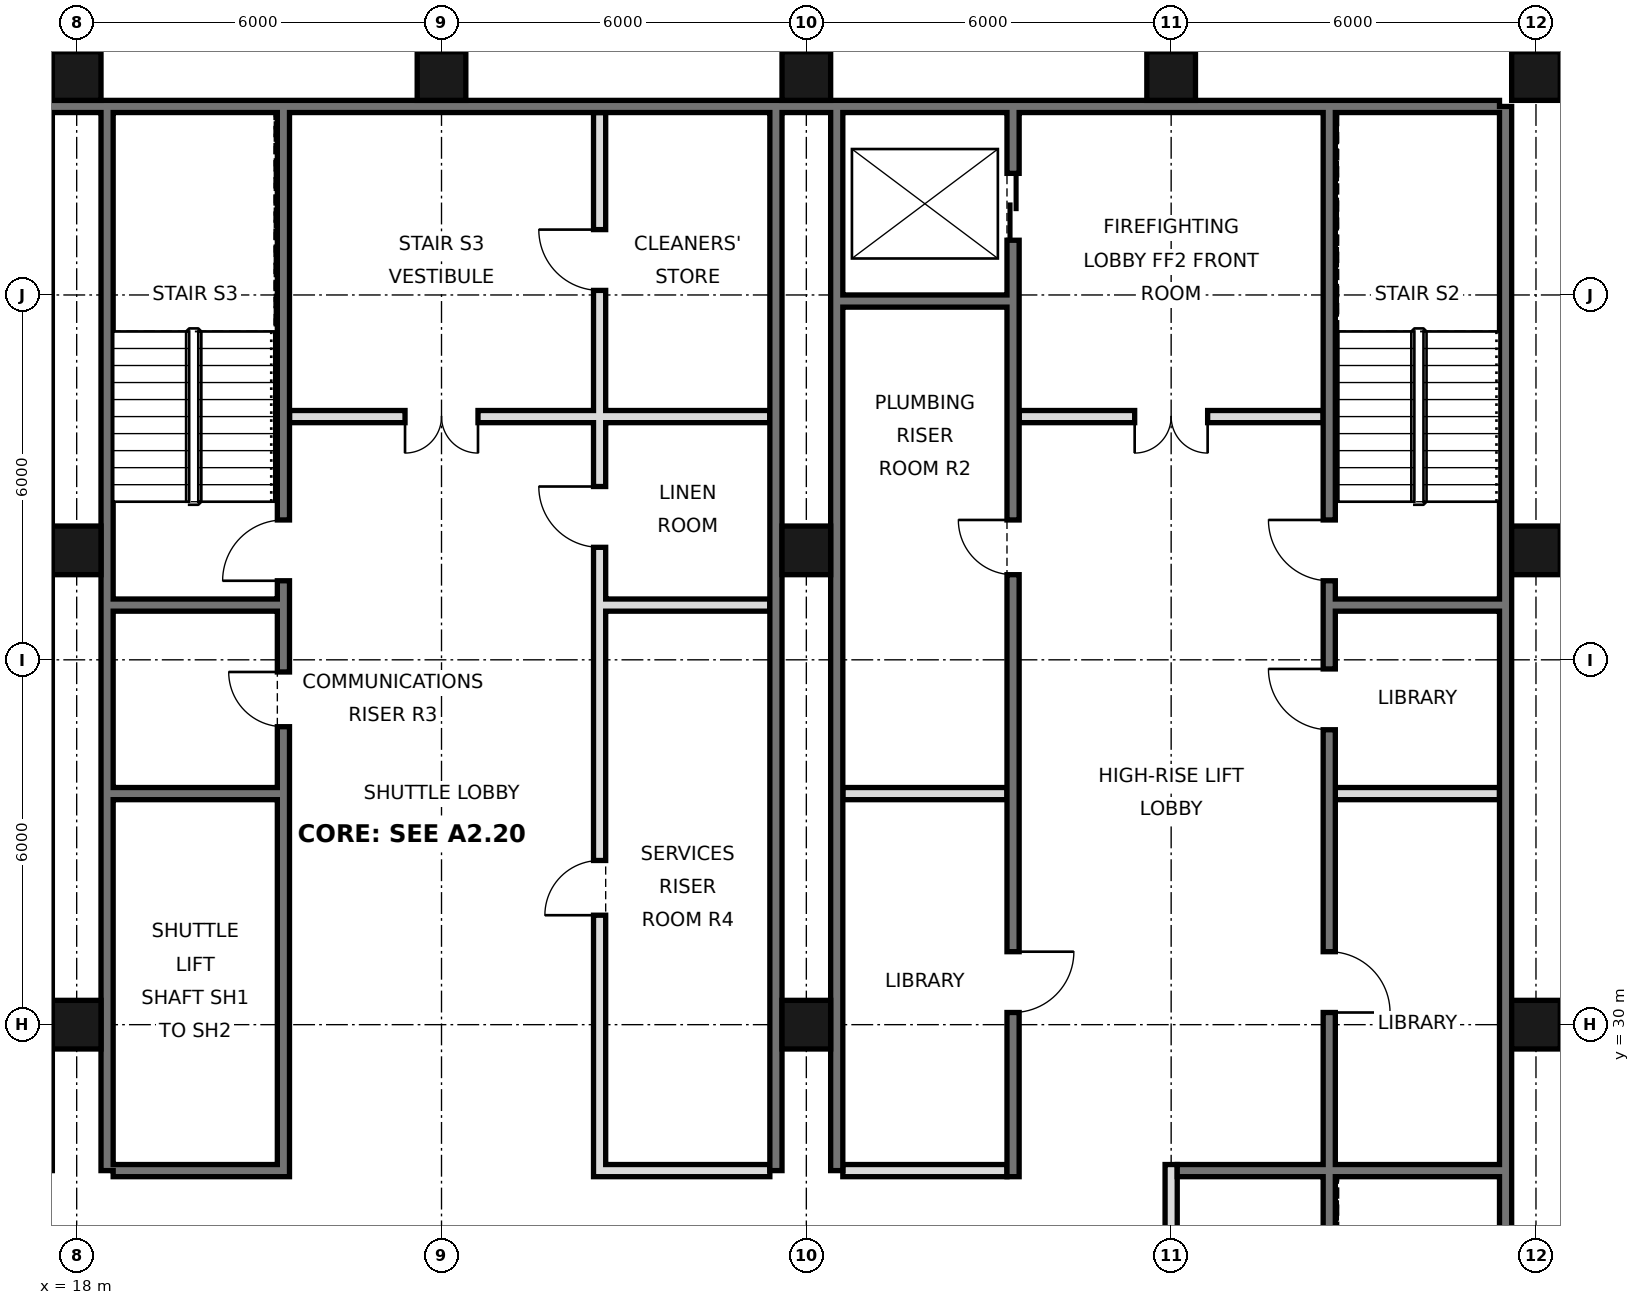
"""IFC4 building model, lengths in metres.
Left out: names, types, materials, properties, quantities, classifications, styles, units other than length and angle.
Written with IfcOpenShell. Run it as: python <this file> out.ifc"""

import sys

from ifc_helpers import new_model, si_unit, direction, frame, frame_2d, origin, origin_2d, place, context, subcontext, project, spatial, rectangle, hollow_rectangle, extrude, element, fill, save


model = new_model("IFC4")
c1 = context("Model", 3, precision=1e-05, world=origin(), true_north=direction((0.0, 1.0)))
c2 = subcontext(c1, "Body", "Model", "MODEL_VIEW")
j1 = project(units=[si_unit("LENGTHUNIT", "METRE"), si_unit("PLANEANGLEUNIT", "RADIAN")], contexts=[c1])
p1 = place(None, origin())
s1 = spatial("IfcSite", under=j1, at=p1, CompositionType="ELEMENT")
p2 = place(p1, origin())
s2 = spatial("IfcBuilding", under=s1, at=p2, CompositionType="ELEMENT")
p3 = place(p2, frame((0.0, 0.0, 78.6)))
s3 = spatial("IfcBuildingStorey", under=s2, at=p3, CompositionType="ELEMENT", Elevation=78.6)
for number, where, z_axis, x_axis in (
    (1, (18.0, 30.0, 0.0), (0.0, 0.0, 1.0), (1.0, 0.0, 0.0)),
    (2, (18.0, 37.8, 0.0), (0.0, 0.0, 1.0), (1.0, 0.0, 0.0)),
    (3, (18.0, 45.6, 0.0), (0.0, 0.0, 1.0), (1.0, 0.0, 0.0)),
    (4, (24.0, 45.6, 0.0), (0.0, 0.0, 1.0), (1.0, 0.0, 0.0)),
    (5, (30.0, 30.0, 0.0), (0.0, 0.0, 1.0), (1.0, 0.0, 0.0)),
    (6, (30.0, 37.8, 0.0), (0.0, 0.0, 1.0), (1.0, 0.0, 0.0)),
    (7, (30.0, 45.6, 0.0), (0.0, 0.0, 1.0), (1.0, 0.0, 0.0)),
    (8, (36.0, 45.6, 0.0), (0.0, 0.0, 1.0), (1.0, 0.0, 0.0)),
    (9, (42.0, 30.0, 0.0), (0.0, 0.0, 1.0), (1.0, 0.0, 0.0)),
    (10, (42.0, 37.8, 0.0), (0.0, 0.0, 1.0), (1.0, 0.0, 0.0)),
    (11, (42.0, 45.6, 0.0), (0.0, 0.0, 1.0), (1.0, 0.0, 0.0)),
):
    element("IfcColumn", number, at=place(p3, frame(where, z_axis=z_axis, x_axis=x_axis)), inside=s3, PredefinedType="COLUMN", context=c2, shape_type="SweptSolid", body=[
        extrude(hollow_rectangle(XDim=0.8, YDim=0.8, WallThickness=0.06, at=origin_2d()), origin(), (0.0, 0.0, 1.0), 3.6),
    ])
p4 = place(p3, frame((41.5, 21.6, 0.0), z_axis=(0.0, 0.0, 1.0), x_axis=(0.0, 1.0, 0.0)))
e12 = element("IfcWall", 12, at=p4, inside=s3, PredefinedType="SOLIDWALL", context=c2, shape_type="SweptSolid", body=[
    extrude(rectangle(XDim=23.5, YDim=0.2, at=frame_2d((11.75, 0.0))), origin(), (0.0, 0.0, 1.0), 3.42),
])
p5 = place(p3, frame((6.6, 45.1, 0.0), z_axis=(0.0, 0.0, 1.0), x_axis=(1.0, 0.0, 0.0)))
e13 = element("IfcWall", 13, at=p5, inside=s3, PredefinedType="SOLIDWALL", context=c2, shape_type="SweptSolid", body=[
    extrude(rectangle(XDim=34.8, YDim=0.2, at=frame_2d((17.4, 0.0))), origin(), (0.0, 0.0, 1.0), 3.42),
])
for number, where, z_axis, x_axis in (
    (14, (18.5, 27.6, 0.0), (0.0, 0.0, 1.0), (0.0, 1.0, 0.0)),
    (15, (29.5, 27.6, 0.0), (0.0, 0.0, 1.0), (0.0, 1.0, 0.0)),
    (16, (30.5, 27.6, 0.0), (0.0, 0.0, 1.0), (0.0, 1.0, 0.0)),
):
    element("IfcWall", number, at=place(p3, frame(where, z_axis=z_axis, x_axis=x_axis)), inside=s3, PredefinedType="SOLIDWALL", context=c2, shape_type="SweptSolid", body=[
        extrude(rectangle(XDim=17.5, YDim=0.2, at=frame_2d((8.75, 0.0))), origin(), (0.0, 0.0, 1.0), 3.42),
    ])
p6 = place(p3, frame((21.4, 27.5, 0.0), z_axis=(0.0, 0.0, 1.0), x_axis=(0.0, 1.0, 0.0)))
e17 = element("IfcWall", 17, at=p6, inside=s3, PredefinedType="SOLIDWALL", context=c2, shape_type="SweptSolid", body=[
    extrude(rectangle(XDim=17.5, YDim=0.2, at=frame_2d((8.75, 0.0))), origin(), (0.0, 0.0, 1.0), 3.42),
])
p7 = place(p6, frame((9.8, 0.0, 0.0)))
e18 = element("IfcOpeningElement", 18, at=p7, cuts=e17, PredefinedType="OPENING", context=c2, shape_type="SweptSolid", body=[
    extrude(rectangle(XDim=1.0, YDim=2.1, at=frame_2d((0.5, 1.05))), frame((0.0, 0.11, 0.0), z_axis=(0.0, -1.0, 0.0), x_axis=(1.0, 0.0, 0.0)), (0.0, 0.0, 1.0), 0.22),
])
p8 = place(p6, frame((7.4, 0.0, 0.0)))
e19 = element("IfcOpeningElement", 19, at=p8, cuts=e17, PredefinedType="OPENING", context=c2, shape_type="SweptSolid", body=[
    extrude(rectangle(XDim=0.9, YDim=2.1, at=frame_2d((0.45, 1.05))), frame((0.0, 0.11, 0.0), z_axis=(0.0, -1.0, 0.0), x_axis=(1.0, 0.0, 0.0)), (0.0, 0.0, 1.0), 0.22),
])
p9 = place(p3, frame((26.6, 27.5, 0.0), z_axis=(0.0, 0.0, 1.0), x_axis=(0.0, 1.0, 0.0)))
e20 = element("IfcWall", 20, at=p9, inside=s3, PredefinedType="SOLIDWALL", context=c2, shape_type="SweptSolid", body=[
    extrude(rectangle(XDim=17.5, YDim=0.2, at=frame_2d((8.75, 0.0))), origin(), (0.0, 0.0, 1.0), 3.42),
])
p10 = place(p9, frame((4.3, 0.0, 0.0)))
e21 = element("IfcOpeningElement", 21, at=p10, cuts=e20, PredefinedType="OPENING", context=c2, shape_type="SweptSolid", body=[
    extrude(rectangle(XDim=0.9, YDim=2.1, at=frame_2d((0.45, 1.05))), frame((0.0, 0.11, 0.0), z_axis=(0.0, -1.0, 0.0), x_axis=(1.0, 0.0, 0.0)), (0.0, 0.0, 1.0), 0.22),
])
p11 = place(p9, frame((10.35, 0.0, 0.0)))
e22 = element("IfcOpeningElement", 22, at=p11, cuts=e20, PredefinedType="OPENING", context=c2, shape_type="SweptSolid", body=[
    extrude(rectangle(XDim=1.0, YDim=2.1, at=frame_2d((0.5, 1.05))), frame((0.0, 0.11, 0.0), z_axis=(0.0, -1.0, 0.0), x_axis=(1.0, 0.0, 0.0)), (0.0, 0.0, 1.0), 0.22),
])
p12 = place(p9, frame((14.575, 0.0, 0.0)))
e23 = element("IfcOpeningElement", 23, at=p12, cuts=e20, PredefinedType="OPENING", context=c2, shape_type="SweptSolid", body=[
    extrude(rectangle(XDim=1.0, YDim=2.1, at=frame_2d((0.5, 1.05))), frame((0.0, 0.11, 0.0), z_axis=(0.0, -1.0, 0.0), x_axis=(1.0, 0.0, 0.0)), (0.0, 0.0, 1.0), 0.22),
])
p13 = place(p3, frame((33.4, 27.5, 0.0), z_axis=(0.0, 0.0, 1.0), x_axis=(0.0, 1.0, 0.0)))
e24 = element("IfcWall", 24, at=p13, inside=s3, PredefinedType="SOLIDWALL", context=c2, shape_type="SweptSolid", body=[
    extrude(rectangle(XDim=17.5, YDim=0.2, at=frame_2d((8.75, 0.0))), origin(), (0.0, 0.0, 1.0), 3.42),
])
p14 = place(p13, frame((15.4, 0.0, 0.0)))
e25 = element("IfcOpeningElement", 25, at=p14, cuts=e24, PredefinedType="OPENING", context=c2, shape_type="SweptSolid", body=[
    extrude(rectangle(XDim=1.1, YDim=2.1, at=frame_2d((0.55, 1.05))), frame((0.0, 0.11, 0.0), z_axis=(0.0, -1.0, 0.0), x_axis=(1.0, 0.0, 0.0)), (0.0, 0.0, 1.0), 0.22),
])
p15 = place(p13, frame((2.7, 0.0, 0.0)))
e26 = element("IfcOpeningElement", 26, at=p15, cuts=e24, PredefinedType="OPENING", context=c2, shape_type="SweptSolid", body=[
    extrude(rectangle(XDim=1.0, YDim=2.1, at=frame_2d((0.5, 1.05))), frame((0.0, 0.11, 0.0), z_axis=(0.0, -1.0, 0.0), x_axis=(1.0, 0.0, 0.0)), (0.0, 0.0, 1.0), 0.22),
])
p16 = place(p13, frame((9.9, 0.0, 0.0)))
e27 = element("IfcOpeningElement", 27, at=p16, cuts=e24, PredefinedType="OPENING", context=c2, shape_type="SweptSolid", body=[
    extrude(rectangle(XDim=0.9, YDim=2.1, at=frame_2d((0.45, 1.05))), frame((0.0, 0.11, 0.0), z_axis=(0.0, -1.0, 0.0), x_axis=(1.0, 0.0, 0.0)), (0.0, 0.0, 1.0), 0.22),
])
p17 = place(p3, frame((36.0, 21.6, 0.0), z_axis=(0.0, 0.0, 1.0), x_axis=(0.0, 1.0, 0.0)))
e28 = element("IfcWall", 28, at=p17, inside=s3, PredefinedType="PARTITIONING", context=c2, shape_type="SweptSolid", body=[
    extrude(rectangle(XDim=6.1, YDim=0.2, at=frame_2d((3.05, 0.0))), origin(), (0.0, 0.0, 1.0), 3.42),
])
p18 = place(p3, frame((38.6, 21.6, 0.0), z_axis=(0.0, 0.0, 1.0), x_axis=(0.0, 1.0, 0.0)))
e29 = element("IfcWall", 29, at=p18, inside=s3, PredefinedType="SOLIDWALL", context=c2, shape_type="SweptSolid", body=[
    extrude(rectangle(XDim=23.4, YDim=0.2, at=frame_2d((11.7, 0.0))), origin(), (0.0, 0.0, 1.0), 3.42),
])
p19 = place(p18, frame((8.6, 0.0, 0.0)))
e30 = element("IfcOpeningElement", 30, at=p19, cuts=e29, PredefinedType="OPENING", context=c2, shape_type="SweptSolid", body=[
    extrude(rectangle(XDim=1.0, YDim=2.1, at=frame_2d((0.5, 1.05))), frame((0.0, 0.11, 0.0), z_axis=(0.0, -1.0, 0.0), x_axis=(1.0, 0.0, 0.0)), (0.0, 0.0, 1.0), 0.22),
])
p20 = place(p18, frame((13.25, 0.0, 0.0)))
e31 = element("IfcOpeningElement", 31, at=p20, cuts=e29, PredefinedType="OPENING", context=c2, shape_type="SweptSolid", body=[
    extrude(rectangle(XDim=1.0, YDim=2.1, at=frame_2d((0.5, 1.05))), frame((0.0, 0.11, 0.0), z_axis=(0.0, -1.0, 0.0), x_axis=(1.0, 0.0, 0.0)), (0.0, 0.0, 1.0), 0.22),
])
p21 = place(p18, frame((15.7, 0.0, 0.0)))
e32 = element("IfcOpeningElement", 32, at=p21, cuts=e29, PredefinedType="OPENING", context=c2, shape_type="SweptSolid", body=[
    extrude(rectangle(XDim=1.0, YDim=2.1, at=frame_2d((0.5, 1.05))), frame((0.0, 0.11, 0.0), z_axis=(0.0, -1.0, 0.0), x_axis=(1.0, 0.0, 0.0)), (0.0, 0.0, 1.0), 0.22),
])
p22 = place(p18, frame((0.175, 0.0, 0.0)))
e33 = element("IfcOpeningElement", 33, at=p22, cuts=e29, PredefinedType="OPENING", context=c2, shape_type="SweptSolid", body=[
    extrude(rectangle(XDim=0.9, YDim=2.1, at=frame_2d((0.45, 1.05))), frame((0.0, 0.11, 0.0), z_axis=(0.0, -1.0, 0.0), x_axis=(1.0, 0.0, 0.0)), (0.0, 0.0, 1.0), 0.22),
])
for number, where, z_axis, x_axis in (
    (34, (18.6, 27.6, 0.0), (0.0, 0.0, 1.0), (1.0, 0.0, 0.0)),
    (35, (26.7, 27.6, 0.0), (0.0, 0.0, 1.0), (1.0, 0.0, 0.0)),
):
    element("IfcWall", number, at=place(p3, frame(where, z_axis=z_axis, x_axis=x_axis)), inside=s3, PredefinedType="SOLIDWALL", context=c2, shape_type="SweptSolid", body=[
        extrude(rectangle(XDim=2.7, YDim=0.2, at=frame_2d((1.35, 0.0))), origin(), (0.0, 0.0, 1.0), 3.42),
    ])
p23 = place(p3, frame((30.6, 27.6, 0.0), z_axis=(0.0, 0.0, 1.0), x_axis=(1.0, 0.0, 0.0)))
e36 = element("IfcWall", 36, at=p23, inside=s3, PredefinedType="PARTITIONING", context=c2, shape_type="SweptSolid", body=[
    extrude(rectangle(XDim=2.7, YDim=0.2, at=frame_2d((1.35, 0.0))), origin(), (0.0, 0.0, 1.0), 3.42),
])
p24 = place(p3, frame((36.1, 27.6, 0.0), z_axis=(0.0, 0.0, 1.0), x_axis=(1.0, 0.0, 0.0)))
e37 = element("IfcWall", 37, at=p24, inside=s3, PredefinedType="SOLIDWALL", context=c2, shape_type="SweptSolid", body=[
    extrude(rectangle(XDim=5.3, YDim=0.2, at=frame_2d((2.65, 0.0))), origin(), (0.0, 0.0, 1.0), 3.42),
])
for number, where, z_axis, x_axis in (
    (38, (18.6, 33.8, 0.0), (0.0, 0.0, 1.0), (1.0, 0.0, 0.0)),
    (39, (30.6, 33.8, 0.0), (0.0, 0.0, 1.0), (1.0, 0.0, 0.0)),
):
    element("IfcWall", number, at=place(p3, frame(where, z_axis=z_axis, x_axis=x_axis)), inside=s3, PredefinedType="SOLIDWALL", context=c2, shape_type="SweptSolid", body=[
        extrude(rectangle(XDim=2.7, YDim=0.2, at=frame_2d((1.35, 0.0))), origin(), (0.0, 0.0, 1.0), 3.42),
    ])
p25 = place(p3, frame((38.7, 33.8, 0.0), z_axis=(0.0, 0.0, 1.0), x_axis=(1.0, 0.0, 0.0)))
e40 = element("IfcWall", 40, at=p25, inside=s3, PredefinedType="PARTITIONING", context=c2, shape_type="SweptSolid", body=[
    extrude(rectangle(XDim=2.7, YDim=0.2, at=frame_2d((1.35, 0.0))), origin(), (0.0, 0.0, 1.0), 3.42),
])
for number, where, z_axis, x_axis in (
    (41, (18.6, 36.9, 0.0), (0.0, 0.0, 1.0), (1.0, 0.0, 0.0)),
    (42, (26.7, 36.9, 0.0), (0.0, 0.0, 1.0), (1.0, 0.0, 0.0)),
    (43, (38.7, 36.9, 0.0), (0.0, 0.0, 1.0), (1.0, 0.0, 0.0)),
):
    element("IfcWall", number, at=place(p3, frame(where, z_axis=z_axis, x_axis=x_axis)), inside=s3, PredefinedType="SOLIDWALL", context=c2, shape_type="SweptSolid", body=[
        extrude(rectangle(XDim=2.7, YDim=0.2, at=frame_2d((1.35, 0.0))), origin(), (0.0, 0.0, 1.0), 3.42),
    ])
p26 = place(p3, frame((21.5, 40.0, 0.0), z_axis=(0.0, 0.0, 1.0), x_axis=(1.0, 0.0, 0.0)))
e44 = element("IfcWall", 44, at=p26, inside=s3, PredefinedType="PARTITIONING", context=c2, shape_type="SweptSolid", body=[
    extrude(rectangle(XDim=7.9, YDim=0.2, at=frame_2d((3.95, 0.0))), origin(), (0.0, 0.0, 1.0), 3.42),
])
p27 = place(p26, frame((1.9, 0.0, 0.0)))
e45 = element("IfcOpeningElement", 45, at=p27, cuts=e44, PredefinedType="OPENING", context=c2, shape_type="SweptSolid", body=[
    extrude(rectangle(XDim=1.2, YDim=2.1, at=frame_2d((0.6, 1.05))), frame((0.0, 0.11, 0.0), z_axis=(0.0, -1.0, 0.0), x_axis=(1.0, 0.0, 0.0)), (0.0, 0.0, 1.0), 0.22),
])
p28 = place(p3, frame((33.5, 40.0, 0.0), z_axis=(0.0, 0.0, 1.0), x_axis=(1.0, 0.0, 0.0)))
e46 = element("IfcWall", 46, at=p28, inside=s3, PredefinedType="PARTITIONING", context=c2, shape_type="SweptSolid", body=[
    extrude(rectangle(XDim=5.0, YDim=0.2, at=frame_2d((2.5, 0.0))), origin(), (0.0, 0.0, 1.0), 3.42),
])
p29 = place(p28, frame((1.9, 0.0, 0.0)))
e47 = element("IfcOpeningElement", 47, at=p29, cuts=e46, PredefinedType="OPENING", context=c2, shape_type="SweptSolid", body=[
    extrude(rectangle(XDim=1.2, YDim=2.1, at=frame_2d((0.6, 1.05))), frame((0.0, 0.11, 0.0), z_axis=(0.0, -1.0, 0.0), x_axis=(1.0, 0.0, 0.0)), (0.0, 0.0, 1.0), 0.22),
])
p30 = place(p3, frame((30.6, 41.9, 0.0), z_axis=(0.0, 0.0, 1.0), x_axis=(1.0, 0.0, 0.0)))
e48 = element("IfcWall", 48, at=p30, inside=s3, PredefinedType="SOLIDWALL", context=c2, shape_type="SweptSolid", body=[
    extrude(rectangle(XDim=2.7, YDim=0.2, at=frame_2d((1.35, 0.0))), origin(), (0.0, 0.0, 1.0), 3.42),
])
p31 = place(p27, frame((1.2, 0.0, 0.0), z_axis=(0.0, 0.0, 1.0), x_axis=(-1.0, 0.0, 0.0)))
e49 = element("IfcDoor", 49, at=p31, inside=s3, OperationType="DOUBLE_DOOR_SINGLE_SWING", PredefinedType="DOOR", context=c2, shape_type="SweptSolid", body=[
    extrude(rectangle(XDim=1.2, YDim=2.1, at=frame_2d((0.6, 1.05))), frame((0.0, 0.025, 0.0), z_axis=(0.0, -1.0, 0.0), x_axis=(1.0, 0.0, 0.0)), (0.0, 0.0, 1.0), 0.05),
])
fill(e45, e49)
p32 = place(p29, frame((1.2, 0.0, 0.0), z_axis=(0.0, 0.0, 1.0), x_axis=(-1.0, 0.0, 0.0)))
e50 = element("IfcDoor", 50, at=p32, inside=s3, OperationType="DOUBLE_DOOR_SINGLE_SWING", PredefinedType="DOOR", context=c2, shape_type="SweptSolid", body=[
    extrude(rectangle(XDim=1.2, YDim=2.1, at=frame_2d((0.6, 1.05))), frame((0.0, 0.025, 0.0), z_axis=(0.0, -1.0, 0.0), x_axis=(1.0, 0.0, 0.0)), (0.0, 0.0, 1.0), 0.05),
])
fill(e47, e50)
p33 = place(p14, origin())
e51 = element("IfcDoor", 51, at=p33, inside=s3, OperationType="DOUBLE_DOOR_SLIDING", PredefinedType="DOOR", context=c2, shape_type="SweptSolid", body=[
    extrude(rectangle(XDim=1.1, YDim=2.1, at=frame_2d((0.55, 1.05))), frame((0.0, 0.025, 0.0), z_axis=(0.0, -1.0, 0.0), x_axis=(1.0, 0.0, 0.0)), (0.0, 0.0, 1.0), 0.05),
])
fill(e25, e51)
p34 = place(p19, frame((1.0, 0.0, 0.0), z_axis=(0.0, 0.0, 1.0), x_axis=(-1.0, 0.0, 0.0)))
e52 = element("IfcDoor", 52, at=p34, inside=s3, OperationType="SINGLE_SWING_RIGHT", PredefinedType="DOOR", context=c2, shape_type="SweptSolid", body=[
    extrude(rectangle(XDim=1.0, YDim=2.1, at=frame_2d((0.5, 1.05))), frame((0.0, 0.025, 0.0), z_axis=(0.0, -1.0, 0.0), x_axis=(1.0, 0.0, 0.0)), (0.0, 0.0, 1.0), 0.05),
])
fill(e30, e52)
p35 = place(p20, frame((1.0, 0.0, 0.0), z_axis=(0.0, 0.0, 1.0), x_axis=(-1.0, 0.0, 0.0)))
e53 = element("IfcDoor", 53, at=p35, inside=s3, OperationType="SINGLE_SWING_LEFT", PredefinedType="DOOR", context=c2, shape_type="SweptSolid", body=[
    extrude(rectangle(XDim=1.0, YDim=2.1, at=frame_2d((0.5, 1.05))), frame((0.0, 0.025, 0.0), z_axis=(0.0, -1.0, 0.0), x_axis=(1.0, 0.0, 0.0)), (0.0, 0.0, 1.0), 0.05),
])
fill(e31, e53)
p36 = place(p15, origin())
e54 = element("IfcDoor", 54, at=p36, inside=s3, OperationType="SINGLE_SWING_RIGHT", PredefinedType="DOOR", context=c2, shape_type="SweptSolid", body=[
    extrude(rectangle(XDim=1.0, YDim=2.1, at=frame_2d((0.5, 1.05))), frame((0.0, 0.025, 0.0), z_axis=(0.0, -1.0, 0.0), x_axis=(1.0, 0.0, 0.0)), (0.0, 0.0, 1.0), 0.05),
])
fill(e26, e54)
p37 = place(p21, frame((1.0, 0.0, 0.0), z_axis=(0.0, 0.0, 1.0), x_axis=(-1.0, 0.0, 0.0)))
e55 = element("IfcDoor", 55, at=p37, inside=s3, OperationType="SINGLE_SWING_LEFT", PredefinedType="DOOR", context=c2, shape_type="SweptSolid", body=[
    extrude(rectangle(XDim=1.0, YDim=2.1, at=frame_2d((0.5, 1.05))), frame((0.0, 0.025, 0.0), z_axis=(0.0, -1.0, 0.0), x_axis=(1.0, 0.0, 0.0)), (0.0, 0.0, 1.0), 0.05),
])
fill(e32, e55)
p38 = place(p7, origin())
e56 = element("IfcDoor", 56, at=p38, inside=s3, OperationType="SINGLE_SWING_LEFT", PredefinedType="DOOR", context=c2, shape_type="SweptSolid", body=[
    extrude(rectangle(XDim=1.0, YDim=2.1, at=frame_2d((0.5, 1.05))), frame((0.0, 0.025, 0.0), z_axis=(0.0, -1.0, 0.0), x_axis=(1.0, 0.0, 0.0)), (0.0, 0.0, 1.0), 0.05),
])
fill(e18, e56)
p39 = place(p16, frame((0.9, 0.0, 0.0), z_axis=(0.0, 0.0, 1.0), x_axis=(-1.0, 0.0, 0.0)))
e57 = element("IfcDoor", 57, at=p39, inside=s3, OperationType="SINGLE_SWING_LEFT", PredefinedType="DOOR", context=c2, shape_type="SweptSolid", body=[
    extrude(rectangle(XDim=0.9, YDim=2.1, at=frame_2d((0.45, 1.05))), frame((0.0, 0.025, 0.0), z_axis=(0.0, -1.0, 0.0), x_axis=(1.0, 0.0, 0.0)), (0.0, 0.0, 1.0), 0.05),
])
fill(e27, e57)
p40 = place(p8, frame((0.9, 0.0, 0.0), z_axis=(0.0, 0.0, 1.0), x_axis=(-1.0, 0.0, 0.0)))
e58 = element("IfcDoor", 58, at=p40, inside=s3, OperationType="SINGLE_SWING_LEFT", PredefinedType="DOOR", context=c2, shape_type="SweptSolid", body=[
    extrude(rectangle(XDim=0.9, YDim=2.1, at=frame_2d((0.45, 1.05))), frame((0.0, 0.025, 0.0), z_axis=(0.0, -1.0, 0.0), x_axis=(1.0, 0.0, 0.0)), (0.0, 0.0, 1.0), 0.05),
])
fill(e19, e58)
p41 = place(p10, origin())
e59 = element("IfcDoor", 59, at=p41, inside=s3, OperationType="SINGLE_SWING_LEFT", PredefinedType="DOOR", context=c2, shape_type="SweptSolid", body=[
    extrude(rectangle(XDim=0.9, YDim=2.1, at=frame_2d((0.45, 1.05))), frame((0.0, 0.025, 0.0), z_axis=(0.0, -1.0, 0.0), x_axis=(1.0, 0.0, 0.0)), (0.0, 0.0, 1.0), 0.05),
])
fill(e21, e59)
p42 = place(p11, frame((1.0, 0.0, 0.0), z_axis=(0.0, 0.0, 1.0), x_axis=(-1.0, 0.0, 0.0)))
e60 = element("IfcDoor", 60, at=p42, inside=s3, OperationType="SINGLE_SWING_LEFT", PredefinedType="DOOR", context=c2, shape_type="SweptSolid", body=[
    extrude(rectangle(XDim=1.0, YDim=2.1, at=frame_2d((0.5, 1.05))), frame((0.0, 0.025, 0.0), z_axis=(0.0, -1.0, 0.0), x_axis=(1.0, 0.0, 0.0)), (0.0, 0.0, 1.0), 0.05),
])
fill(e22, e60)
p43 = place(p12, frame((1.0, 0.0, 0.0), z_axis=(0.0, 0.0, 1.0), x_axis=(-1.0, 0.0, 0.0)))
e61 = element("IfcDoor", 61, at=p43, inside=s3, OperationType="SINGLE_SWING_LEFT", PredefinedType="DOOR", context=c2, shape_type="SweptSolid", body=[
    extrude(rectangle(XDim=1.0, YDim=2.1, at=frame_2d((0.5, 1.05))), frame((0.0, 0.025, 0.0), z_axis=(0.0, -1.0, 0.0), x_axis=(1.0, 0.0, 0.0)), (0.0, 0.0, 1.0), 0.05),
])
fill(e23, e61)
save(model, sys.argv[1])
